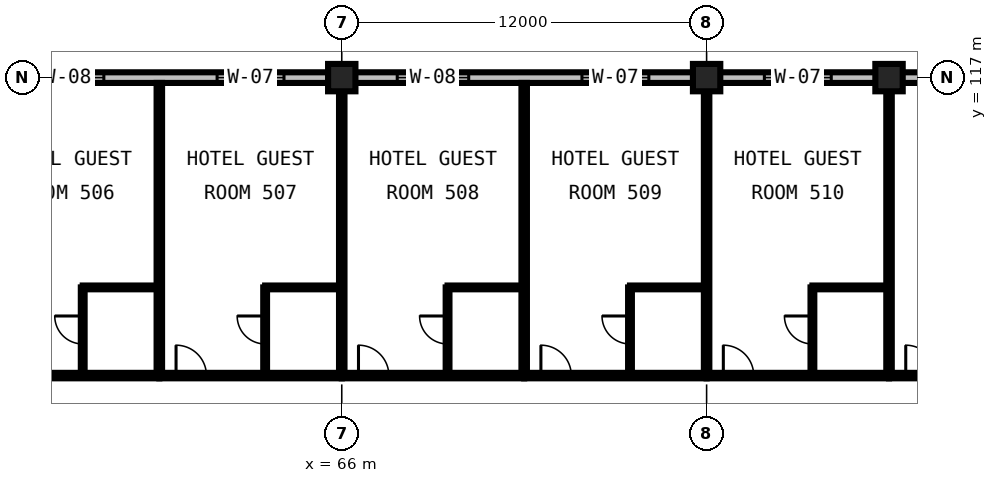
"""IFC4 building model, lengths in metres.
Left out: names, types, materials, properties, quantities, classifications, styles, units other than length and angle.
Written with IfcOpenShell. Run it as: python <this file> out.ifc"""

import sys

from ifc_helpers import new_model, si_unit, direction, frame, frame_2d, origin, origin_2d, place, context, subcontext, project, spatial, rectangle, extrude, element, fill, save


model = new_model("IFC4")
c1 = context("Model", 3, precision=1e-05, world=origin(), true_north=direction((0.0, 1.0)))
c2 = subcontext(c1, "Body", "Model", "MODEL_VIEW")
j1 = project(units=[si_unit("LENGTHUNIT", "METRE"), si_unit("PLANEANGLEUNIT", "RADIAN")], contexts=[c1])
p1 = place(None, origin())
s1 = spatial("IfcSite", under=j1, at=p1, CompositionType="ELEMENT")
p2 = place(p1, origin())
s2 = spatial("IfcBuilding", under=s1, at=p2, CompositionType="ELEMENT")
p3 = place(p2, frame((0.0, 0.0, 27.6)))
s3 = spatial("IfcBuildingStorey", under=s2, at=p3, CompositionType="ELEMENT", Elevation=27.6)
for number, where, z_axis, x_axis in (
    (1, (66.0, 117.0, 0.0), (0.0, 0.0, 1.0), (1.0, 0.0, 0.0)),
    (2, (78.0, 117.0, 0.0), (0.0, 0.0, 1.0), (1.0, 0.0, 0.0)),
    (3, (84.0, 117.0, 0.0), (0.0, 0.0, 1.0), (1.0, 0.0, 0.0)),
):
    element("IfcColumn", number, at=place(p3, frame(where, z_axis=z_axis, x_axis=x_axis)), inside=s3, PredefinedType="COLUMN", context=c2, shape_type="SweptSolid", body=[
        extrude(rectangle(XDim=0.9, YDim=0.9, at=origin_2d()), origin(), (0.0, 0.0, 1.0), 3.6),
    ])
p4 = place(p3, frame((66.0, 117.0, 0.0), z_axis=(0.0, 0.0, 1.0), x_axis=(-1.0, 0.0, 0.0)))
e4 = element("IfcWall", 4, at=p4, inside=s3, PredefinedType="STANDARD", context=c2, shape_type="SweptSolid", body=[
    extrude(rectangle(XDim=12.0, YDim=0.35, at=frame_2d((6.0, 0.0))), origin(), (0.0, 0.0, 1.0), 2.486),
])
p5 = place(p4, frame((1.9, 0.0, 0.75)))
e5 = element("IfcOpeningElement", 5, at=p5, cuts=e4, PredefinedType="OPENING", context=c2, shape_type="SweptSolid", body=[
    extrude(rectangle(XDim=2.2, YDim=1.6, at=frame_2d((1.1, 0.8))), frame((0.0, 0.19, 0.0), z_axis=(0.0, -1.0, 0.0), x_axis=(1.0, 0.0, 0.0)), (0.0, 0.0, 1.0), 0.38),
])
p6 = place(p4, frame((7.825, 0.0, 0.75)))
e6 = element("IfcOpeningElement", 6, at=p6, cuts=e4, PredefinedType="OPENING", context=c2, shape_type="SweptSolid", body=[
    extrude(rectangle(XDim=2.35, YDim=1.6, at=frame_2d((1.175, 0.8))), frame((0.0, 0.19, 0.0), z_axis=(0.0, -1.0, 0.0), x_axis=(1.0, 0.0, 0.0)), (0.0, 0.0, 1.0), 0.38),
])
p7 = place(p3, frame((78.0, 117.0, 0.0), z_axis=(0.0, 0.0, 1.0), x_axis=(-1.0, 0.0, 0.0)))
e7 = element("IfcWall", 7, at=p7, inside=s3, PredefinedType="STANDARD", context=c2, shape_type="SweptSolid", body=[
    extrude(rectangle(XDim=12.0, YDim=0.35, at=frame_2d((6.0, 0.0))), origin(), (0.0, 0.0, 1.0), 2.486),
])
p8 = place(p7, frame((1.9, 0.0, 0.75)))
e8 = element("IfcOpeningElement", 8, at=p8, cuts=e7, PredefinedType="OPENING", context=c2, shape_type="SweptSolid", body=[
    extrude(rectangle(XDim=2.2, YDim=1.6, at=frame_2d((1.1, 0.8))), frame((0.0, 0.19, 0.0), z_axis=(0.0, -1.0, 0.0), x_axis=(1.0, 0.0, 0.0)), (0.0, 0.0, 1.0), 0.38),
])
p9 = place(p7, frame((7.825, 0.0, 0.75)))
e9 = element("IfcOpeningElement", 9, at=p9, cuts=e7, PredefinedType="OPENING", context=c2, shape_type="SweptSolid", body=[
    extrude(rectangle(XDim=2.35, YDim=1.6, at=frame_2d((1.175, 0.8))), frame((0.0, 0.19, 0.0), z_axis=(0.0, -1.0, 0.0), x_axis=(1.0, 0.0, 0.0)), (0.0, 0.0, 1.0), 0.38),
])
p10 = place(p3, frame((84.0, 117.0, 0.0), z_axis=(0.0, 0.0, 1.0), x_axis=(-1.0, 0.0, 0.0)))
e10 = element("IfcWall", 10, at=p10, inside=s3, PredefinedType="STANDARD", context=c2, shape_type="SweptSolid", body=[
    extrude(rectangle(XDim=6.0, YDim=0.35, at=frame_2d((3.0, 0.0))), origin(), (0.0, 0.0, 1.0), 2.486),
])
p11 = place(p10, frame((1.9, 0.0, 0.75)))
e11 = element("IfcOpeningElement", 11, at=p11, cuts=e10, PredefinedType="OPENING", context=c2, shape_type="SweptSolid", body=[
    extrude(rectangle(XDim=2.2, YDim=1.6, at=frame_2d((1.1, 0.8))), frame((0.0, 0.19, 0.0), z_axis=(0.0, -1.0, 0.0), x_axis=(1.0, 0.0, 0.0)), (0.0, 0.0, 1.0), 0.38),
])
p12 = place(p3, frame((90.0, 117.0, 0.0), z_axis=(0.0, 0.0, 1.0), x_axis=(-1.0, 0.0, 0.0)))
e12 = element("IfcWall", 12, at=p12, inside=s3, PredefinedType="STANDARD", context=c2, shape_type="SweptSolid", body=[
    extrude(rectangle(XDim=6.0, YDim=0.35, at=frame_2d((3.0, 0.0))), origin(), (0.0, 0.0, 1.0), 2.486),
])
p13 = place(p12, frame((1.9, 0.0, 0.75)))
e13 = element("IfcOpeningElement", 13, at=p13, cuts=e12, PredefinedType="OPENING", context=c2, shape_type="SweptSolid", body=[
    extrude(rectangle(XDim=2.2, YDim=1.6, at=frame_2d((1.1, 0.8))), frame((0.0, 0.19, 0.0), z_axis=(0.0, -1.0, 0.0), x_axis=(1.0, 0.0, 0.0)), (0.0, 0.0, 1.0), 0.38),
])
p14 = place(p3, frame((54.0, 107.2, 0.0), z_axis=(0.0, 0.0, 1.0), x_axis=(1.0, 0.0, 0.0)))
e14 = element("IfcWall", 14, at=p14, inside=s3, PredefinedType="PARTITIONING", context=c2, shape_type="SweptSolid", body=[
    extrude(rectangle(XDim=6.0, YDim=0.18, at=frame_2d((3.0, 0.0))), origin(), (0.0, 0.0, 1.0), 3.29),
])
p15 = place(p14, frame((0.55, 0.0, 0.0)))
e15 = element("IfcOpeningElement", 15, at=p15, cuts=e14, PredefinedType="OPENING", context=c2, shape_type="SweptSolid", body=[
    extrude(rectangle(XDim=1.0, YDim=2.15, at=frame_2d((0.5, 1.075))), frame((0.0, 0.105, 0.0), z_axis=(0.0, -1.0, 0.0), x_axis=(1.0, 0.0, 0.0)), (0.0, 0.0, 1.0), 0.21),
])
p16 = place(p3, frame((60.0, 107.2, 0.0), z_axis=(0.0, 0.0, 1.0), x_axis=(0.0, 1.0, 0.0)))
e16 = element("IfcWall", 16, at=p16, inside=s3, PredefinedType="PARTITIONING", context=c2, shape_type="SweptSolid", body=[
    extrude(rectangle(XDim=9.625, YDim=0.18, at=frame_2d((4.812, 0.0))), origin(), (0.0, 0.0, 1.0), 3.29),
])
p17 = place(p3, frame((57.48, 107.29, 0.0), z_axis=(0.0, 0.0, 1.0), x_axis=(0.0, 1.0, 0.0)))
e17 = element("IfcWall", 17, at=p17, inside=s3, PredefinedType="PARTITIONING", context=c2, shape_type="SweptSolid", body=[
    extrude(rectangle(XDim=2.81, YDim=0.125, at=frame_2d((1.405, 0.0))), origin(), (0.0, 0.0, 1.0), 3.29),
])
p18 = place(p17, frame((0.95, 0.0, 0.0)))
e18 = element("IfcOpeningElement", 18, at=p18, cuts=e17, PredefinedType="OPENING", context=c2, shape_type="SweptSolid", body=[
    extrude(rectangle(XDim=0.92, YDim=2.1, at=frame_2d((0.46, 1.05))), frame((0.0, 0.077, 0.0), z_axis=(0.0, -1.0, 0.0), x_axis=(1.0, 0.0, 0.0)), (0.0, 0.0, 1.0), 0.155),
])
p19 = place(p3, frame((57.48, 110.1, 0.0), z_axis=(0.0, 0.0, 1.0), x_axis=(1.0, 0.0, 0.0)))
e19 = element("IfcWall", 19, at=p19, inside=s3, PredefinedType="PARTITIONING", context=c2, shape_type="SweptSolid", body=[
    extrude(rectangle(XDim=2.52, YDim=0.125, at=frame_2d((1.26, 0.0))), origin(), (0.0, 0.0, 1.0), 3.29),
])
p20 = place(p3, frame((60.0, 107.2, 0.0), z_axis=(0.0, 0.0, 1.0), x_axis=(1.0, 0.0, 0.0)))
e20 = element("IfcWall", 20, at=p20, inside=s3, PredefinedType="PARTITIONING", context=c2, shape_type="SweptSolid", body=[
    extrude(rectangle(XDim=6.0, YDim=0.18, at=frame_2d((3.0, 0.0))), origin(), (0.0, 0.0, 1.0), 3.29),
])
p21 = place(p20, frame((0.55, 0.0, 0.0)))
e21 = element("IfcOpeningElement", 21, at=p21, cuts=e20, PredefinedType="OPENING", context=c2, shape_type="SweptSolid", body=[
    extrude(rectangle(XDim=1.0, YDim=2.15, at=frame_2d((0.5, 1.075))), frame((0.0, 0.105, 0.0), z_axis=(0.0, -1.0, 0.0), x_axis=(1.0, 0.0, 0.0)), (0.0, 0.0, 1.0), 0.21),
])
p22 = place(p3, frame((66.0, 107.2, 0.0), z_axis=(0.0, 0.0, 1.0), x_axis=(0.0, 1.0, 0.0)))
e22 = element("IfcWall", 22, at=p22, inside=s3, PredefinedType="PARTITIONING", context=c2, shape_type="SweptSolid", body=[
    extrude(rectangle(XDim=9.625, YDim=0.18, at=frame_2d((4.812, 0.0))), origin(), (0.0, 0.0, 1.0), 2.59),
])
p23 = place(p3, frame((63.48, 107.29, 0.0), z_axis=(0.0, 0.0, 1.0), x_axis=(0.0, 1.0, 0.0)))
e23 = element("IfcWall", 23, at=p23, inside=s3, PredefinedType="PARTITIONING", context=c2, shape_type="SweptSolid", body=[
    extrude(rectangle(XDim=2.81, YDim=0.125, at=frame_2d((1.405, 0.0))), origin(), (0.0, 0.0, 1.0), 3.29),
])
p24 = place(p23, frame((0.95, 0.0, 0.0)))
e24 = element("IfcOpeningElement", 24, at=p24, cuts=e23, PredefinedType="OPENING", context=c2, shape_type="SweptSolid", body=[
    extrude(rectangle(XDim=0.92, YDim=2.1, at=frame_2d((0.46, 1.05))), frame((0.0, 0.077, 0.0), z_axis=(0.0, -1.0, 0.0), x_axis=(1.0, 0.0, 0.0)), (0.0, 0.0, 1.0), 0.155),
])
p25 = place(p3, frame((63.48, 110.1, 0.0), z_axis=(0.0, 0.0, 1.0), x_axis=(1.0, 0.0, 0.0)))
e25 = element("IfcWall", 25, at=p25, inside=s3, PredefinedType="PARTITIONING", context=c2, shape_type="SweptSolid", body=[
    extrude(rectangle(XDim=2.52, YDim=0.125, at=frame_2d((1.26, 0.0))), origin(), (0.0, 0.0, 1.0), 3.29),
])
p26 = place(p3, frame((66.0, 107.2, 0.0), z_axis=(0.0, 0.0, 1.0), x_axis=(1.0, 0.0, 0.0)))
e26 = element("IfcWall", 26, at=p26, inside=s3, PredefinedType="PARTITIONING", context=c2, shape_type="SweptSolid", body=[
    extrude(rectangle(XDim=6.0, YDim=0.18, at=frame_2d((3.0, 0.0))), origin(), (0.0, 0.0, 1.0), 3.29),
])
p27 = place(p26, frame((0.55, 0.0, 0.0)))
e27 = element("IfcOpeningElement", 27, at=p27, cuts=e26, PredefinedType="OPENING", context=c2, shape_type="SweptSolid", body=[
    extrude(rectangle(XDim=1.0, YDim=2.15, at=frame_2d((0.5, 1.075))), frame((0.0, 0.105, 0.0), z_axis=(0.0, -1.0, 0.0), x_axis=(1.0, 0.0, 0.0)), (0.0, 0.0, 1.0), 0.21),
])
p28 = place(p3, frame((72.0, 107.2, 0.0), z_axis=(0.0, 0.0, 1.0), x_axis=(0.0, 1.0, 0.0)))
e28 = element("IfcWall", 28, at=p28, inside=s3, PredefinedType="PARTITIONING", context=c2, shape_type="SweptSolid", body=[
    extrude(rectangle(XDim=9.625, YDim=0.18, at=frame_2d((4.812, 0.0))), origin(), (0.0, 0.0, 1.0), 3.29),
])
p29 = place(p3, frame((69.48, 107.29, 0.0), z_axis=(0.0, 0.0, 1.0), x_axis=(0.0, 1.0, 0.0)))
e29 = element("IfcWall", 29, at=p29, inside=s3, PredefinedType="PARTITIONING", context=c2, shape_type="SweptSolid", body=[
    extrude(rectangle(XDim=2.81, YDim=0.125, at=frame_2d((1.405, 0.0))), origin(), (0.0, 0.0, 1.0), 3.29),
])
p30 = place(p29, frame((0.95, 0.0, 0.0)))
e30 = element("IfcOpeningElement", 30, at=p30, cuts=e29, PredefinedType="OPENING", context=c2, shape_type="SweptSolid", body=[
    extrude(rectangle(XDim=0.92, YDim=2.1, at=frame_2d((0.46, 1.05))), frame((0.0, 0.077, 0.0), z_axis=(0.0, -1.0, 0.0), x_axis=(1.0, 0.0, 0.0)), (0.0, 0.0, 1.0), 0.155),
])
p31 = place(p3, frame((69.48, 110.1, 0.0), z_axis=(0.0, 0.0, 1.0), x_axis=(1.0, 0.0, 0.0)))
e31 = element("IfcWall", 31, at=p31, inside=s3, PredefinedType="PARTITIONING", context=c2, shape_type="SweptSolid", body=[
    extrude(rectangle(XDim=2.52, YDim=0.125, at=frame_2d((1.26, 0.0))), origin(), (0.0, 0.0, 1.0), 3.29),
])
p32 = place(p3, frame((72.0, 107.2, 0.0), z_axis=(0.0, 0.0, 1.0), x_axis=(1.0, 0.0, 0.0)))
e32 = element("IfcWall", 32, at=p32, inside=s3, PredefinedType="PARTITIONING", context=c2, shape_type="SweptSolid", body=[
    extrude(rectangle(XDim=6.0, YDim=0.18, at=frame_2d((3.0, 0.0))), origin(), (0.0, 0.0, 1.0), 3.29),
])
p33 = place(p32, frame((0.55, 0.0, 0.0)))
e33 = element("IfcOpeningElement", 33, at=p33, cuts=e32, PredefinedType="OPENING", context=c2, shape_type="SweptSolid", body=[
    extrude(rectangle(XDim=1.0, YDim=2.15, at=frame_2d((0.5, 1.075))), frame((0.0, 0.105, 0.0), z_axis=(0.0, -1.0, 0.0), x_axis=(1.0, 0.0, 0.0)), (0.0, 0.0, 1.0), 0.21),
])
p34 = place(p3, frame((78.0, 107.2, 0.0), z_axis=(0.0, 0.0, 1.0), x_axis=(0.0, 1.0, 0.0)))
e34 = element("IfcWall", 34, at=p34, inside=s3, PredefinedType="PARTITIONING", context=c2, shape_type="SweptSolid", body=[
    extrude(rectangle(XDim=9.625, YDim=0.18, at=frame_2d((4.812, 0.0))), origin(), (0.0, 0.0, 1.0), 2.59),
])
p35 = place(p3, frame((75.48, 107.29, 0.0), z_axis=(0.0, 0.0, 1.0), x_axis=(0.0, 1.0, 0.0)))
e35 = element("IfcWall", 35, at=p35, inside=s3, PredefinedType="PARTITIONING", context=c2, shape_type="SweptSolid", body=[
    extrude(rectangle(XDim=2.81, YDim=0.125, at=frame_2d((1.405, 0.0))), origin(), (0.0, 0.0, 1.0), 3.29),
])
p36 = place(p35, frame((0.95, 0.0, 0.0)))
e36 = element("IfcOpeningElement", 36, at=p36, cuts=e35, PredefinedType="OPENING", context=c2, shape_type="SweptSolid", body=[
    extrude(rectangle(XDim=0.92, YDim=2.1, at=frame_2d((0.46, 1.05))), frame((0.0, 0.077, 0.0), z_axis=(0.0, -1.0, 0.0), x_axis=(1.0, 0.0, 0.0)), (0.0, 0.0, 1.0), 0.155),
])
p37 = place(p3, frame((75.48, 110.1, 0.0), z_axis=(0.0, 0.0, 1.0), x_axis=(1.0, 0.0, 0.0)))
e37 = element("IfcWall", 37, at=p37, inside=s3, PredefinedType="PARTITIONING", context=c2, shape_type="SweptSolid", body=[
    extrude(rectangle(XDim=2.52, YDim=0.125, at=frame_2d((1.26, 0.0))), origin(), (0.0, 0.0, 1.0), 3.29),
])
p38 = place(p3, frame((78.0, 107.2, 0.0), z_axis=(0.0, 0.0, 1.0), x_axis=(1.0, 0.0, 0.0)))
e38 = element("IfcWall", 38, at=p38, inside=s3, PredefinedType="PARTITIONING", context=c2, shape_type="SweptSolid", body=[
    extrude(rectangle(XDim=6.0, YDim=0.18, at=frame_2d((3.0, 0.0))), origin(), (0.0, 0.0, 1.0), 3.29),
])
p39 = place(p38, frame((0.55, 0.0, 0.0)))
e39 = element("IfcOpeningElement", 39, at=p39, cuts=e38, PredefinedType="OPENING", context=c2, shape_type="SweptSolid", body=[
    extrude(rectangle(XDim=1.0, YDim=2.15, at=frame_2d((0.5, 1.075))), frame((0.0, 0.105, 0.0), z_axis=(0.0, -1.0, 0.0), x_axis=(1.0, 0.0, 0.0)), (0.0, 0.0, 1.0), 0.21),
])
p40 = place(p3, frame((84.0, 107.2, 0.0), z_axis=(0.0, 0.0, 1.0), x_axis=(0.0, 1.0, 0.0)))
e40 = element("IfcWall", 40, at=p40, inside=s3, PredefinedType="PARTITIONING", context=c2, shape_type="SweptSolid", body=[
    extrude(rectangle(XDim=9.625, YDim=0.18, at=frame_2d((4.812, 0.0))), origin(), (0.0, 0.0, 1.0), 2.59),
])
p41 = place(p3, frame((81.48, 107.29, 0.0), z_axis=(0.0, 0.0, 1.0), x_axis=(0.0, 1.0, 0.0)))
e41 = element("IfcWall", 41, at=p41, inside=s3, PredefinedType="PARTITIONING", context=c2, shape_type="SweptSolid", body=[
    extrude(rectangle(XDim=2.81, YDim=0.125, at=frame_2d((1.405, 0.0))), origin(), (0.0, 0.0, 1.0), 3.29),
])
p42 = place(p41, frame((0.95, 0.0, 0.0)))
e42 = element("IfcOpeningElement", 42, at=p42, cuts=e41, PredefinedType="OPENING", context=c2, shape_type="SweptSolid", body=[
    extrude(rectangle(XDim=0.92, YDim=2.1, at=frame_2d((0.46, 1.05))), frame((0.0, 0.077, 0.0), z_axis=(0.0, -1.0, 0.0), x_axis=(1.0, 0.0, 0.0)), (0.0, 0.0, 1.0), 0.155),
])
p43 = place(p3, frame((81.48, 110.1, 0.0), z_axis=(0.0, 0.0, 1.0), x_axis=(1.0, 0.0, 0.0)))
e43 = element("IfcWall", 43, at=p43, inside=s3, PredefinedType="PARTITIONING", context=c2, shape_type="SweptSolid", body=[
    extrude(rectangle(XDim=2.52, YDim=0.125, at=frame_2d((1.26, 0.0))), origin(), (0.0, 0.0, 1.0), 3.29),
])
p44 = place(p3, frame((84.0, 107.2, 0.0), z_axis=(0.0, 0.0, 1.0), x_axis=(1.0, 0.0, 0.0)))
e44 = element("IfcWall", 44, at=p44, inside=s3, PredefinedType="PARTITIONING", context=c2, shape_type="SweptSolid", body=[
    extrude(rectangle(XDim=6.0, YDim=0.18, at=frame_2d((3.0, 0.0))), origin(), (0.0, 0.0, 1.0), 3.29),
])
p45 = place(p44, frame((0.55, 0.0, 0.0)))
e45 = element("IfcOpeningElement", 45, at=p45, cuts=e44, PredefinedType="OPENING", context=c2, shape_type="SweptSolid", body=[
    extrude(rectangle(XDim=1.0, YDim=2.15, at=frame_2d((0.5, 1.075))), frame((0.0, 0.105, 0.0), z_axis=(0.0, -1.0, 0.0), x_axis=(1.0, 0.0, 0.0)), (0.0, 0.0, 1.0), 0.21),
])
p46 = place(p5, origin())
e46 = element("IfcWindow", 46, at=p46, inside=s3, PartitioningType="DOUBLE_PANEL_VERTICAL", PredefinedType="WINDOW", context=c2, shape_type="SweptSolid", body=[
    extrude(rectangle(XDim=2.2, YDim=1.6, at=frame_2d((1.1, 0.8))), frame((0.0, 0.03, 0.0), z_axis=(0.0, -1.0, 0.0), x_axis=(1.0, 0.0, 0.0)), (0.0, 0.0, 1.0), 0.06),
])
fill(e5, e46)
p47 = place(p6, origin())
e47 = element("IfcWindow", 47, at=p47, inside=s3, PartitioningType="DOUBLE_PANEL_VERTICAL", PredefinedType="WINDOW", context=c2, shape_type="SweptSolid", body=[
    extrude(rectangle(XDim=2.35, YDim=1.6, at=frame_2d((1.175, 0.8))), frame((0.0, 0.03, 0.0), z_axis=(0.0, -1.0, 0.0), x_axis=(1.0, 0.0, 0.0)), (0.0, 0.0, 1.0), 0.06),
])
fill(e6, e47)
p48 = place(p8, origin())
e48 = element("IfcWindow", 48, at=p48, inside=s3, PartitioningType="DOUBLE_PANEL_VERTICAL", PredefinedType="WINDOW", context=c2, shape_type="SweptSolid", body=[
    extrude(rectangle(XDim=2.2, YDim=1.6, at=frame_2d((1.1, 0.8))), frame((0.0, 0.03, 0.0), z_axis=(0.0, -1.0, 0.0), x_axis=(1.0, 0.0, 0.0)), (0.0, 0.0, 1.0), 0.06),
])
fill(e8, e48)
p49 = place(p9, origin())
e49 = element("IfcWindow", 49, at=p49, inside=s3, PartitioningType="DOUBLE_PANEL_VERTICAL", PredefinedType="WINDOW", context=c2, shape_type="SweptSolid", body=[
    extrude(rectangle(XDim=2.35, YDim=1.6, at=frame_2d((1.175, 0.8))), frame((0.0, 0.03, 0.0), z_axis=(0.0, -1.0, 0.0), x_axis=(1.0, 0.0, 0.0)), (0.0, 0.0, 1.0), 0.06),
])
fill(e9, e49)
p50 = place(p11, origin())
e50 = element("IfcWindow", 50, at=p50, inside=s3, PartitioningType="DOUBLE_PANEL_VERTICAL", PredefinedType="WINDOW", context=c2, shape_type="SweptSolid", body=[
    extrude(rectangle(XDim=2.2, YDim=1.6, at=frame_2d((1.1, 0.8))), frame((0.0, 0.03, 0.0), z_axis=(0.0, -1.0, 0.0), x_axis=(1.0, 0.0, 0.0)), (0.0, 0.0, 1.0), 0.06),
])
fill(e11, e50)
p51 = place(p18, origin())
e51 = element("IfcDoor", 51, at=p51, inside=s3, OperationType="SINGLE_SWING_RIGHT", PredefinedType="DOOR", context=c2, shape_type="SweptSolid", body=[
    extrude(rectangle(XDim=0.92, YDim=2.1, at=frame_2d((0.46, 1.05))), frame((0.0, 0.025, 0.0), z_axis=(0.0, -1.0, 0.0), x_axis=(1.0, 0.0, 0.0)), (0.0, 0.0, 1.0), 0.05),
])
fill(e18, e51)
p52 = place(p21, origin())
e52 = element("IfcDoor", 52, at=p52, inside=s3, OperationType="SINGLE_SWING_LEFT", PredefinedType="DOOR", context=c2, shape_type="SweptSolid", body=[
    extrude(rectangle(XDim=1.0, YDim=2.15, at=frame_2d((0.5, 1.075))), frame((0.0, 0.025, 0.0), z_axis=(0.0, -1.0, 0.0), x_axis=(1.0, 0.0, 0.0)), (0.0, 0.0, 1.0), 0.05),
])
fill(e21, e52)
p53 = place(p24, origin())
e53 = element("IfcDoor", 53, at=p53, inside=s3, OperationType="SINGLE_SWING_RIGHT", PredefinedType="DOOR", context=c2, shape_type="SweptSolid", body=[
    extrude(rectangle(XDim=0.92, YDim=2.1, at=frame_2d((0.46, 1.05))), frame((0.0, 0.025, 0.0), z_axis=(0.0, -1.0, 0.0), x_axis=(1.0, 0.0, 0.0)), (0.0, 0.0, 1.0), 0.05),
])
fill(e24, e53)
p54 = place(p27, origin())
e54 = element("IfcDoor", 54, at=p54, inside=s3, OperationType="SINGLE_SWING_LEFT", PredefinedType="DOOR", context=c2, shape_type="SweptSolid", body=[
    extrude(rectangle(XDim=1.0, YDim=2.15, at=frame_2d((0.5, 1.075))), frame((0.0, 0.025, 0.0), z_axis=(0.0, -1.0, 0.0), x_axis=(1.0, 0.0, 0.0)), (0.0, 0.0, 1.0), 0.05),
])
fill(e27, e54)
p55 = place(p30, origin())
e55 = element("IfcDoor", 55, at=p55, inside=s3, OperationType="SINGLE_SWING_RIGHT", PredefinedType="DOOR", context=c2, shape_type="SweptSolid", body=[
    extrude(rectangle(XDim=0.92, YDim=2.1, at=frame_2d((0.46, 1.05))), frame((0.0, 0.025, 0.0), z_axis=(0.0, -1.0, 0.0), x_axis=(1.0, 0.0, 0.0)), (0.0, 0.0, 1.0), 0.05),
])
fill(e30, e55)
p56 = place(p33, origin())
e56 = element("IfcDoor", 56, at=p56, inside=s3, OperationType="SINGLE_SWING_LEFT", PredefinedType="DOOR", context=c2, shape_type="SweptSolid", body=[
    extrude(rectangle(XDim=1.0, YDim=2.15, at=frame_2d((0.5, 1.075))), frame((0.0, 0.025, 0.0), z_axis=(0.0, -1.0, 0.0), x_axis=(1.0, 0.0, 0.0)), (0.0, 0.0, 1.0), 0.05),
])
fill(e33, e56)
p57 = place(p36, origin())
e57 = element("IfcDoor", 57, at=p57, inside=s3, OperationType="SINGLE_SWING_RIGHT", PredefinedType="DOOR", context=c2, shape_type="SweptSolid", body=[
    extrude(rectangle(XDim=0.92, YDim=2.1, at=frame_2d((0.46, 1.05))), frame((0.0, 0.025, 0.0), z_axis=(0.0, -1.0, 0.0), x_axis=(1.0, 0.0, 0.0)), (0.0, 0.0, 1.0), 0.05),
])
fill(e36, e57)
p58 = place(p39, origin())
e58 = element("IfcDoor", 58, at=p58, inside=s3, OperationType="SINGLE_SWING_LEFT", PredefinedType="DOOR", context=c2, shape_type="SweptSolid", body=[
    extrude(rectangle(XDim=1.0, YDim=2.15, at=frame_2d((0.5, 1.075))), frame((0.0, 0.025, 0.0), z_axis=(0.0, -1.0, 0.0), x_axis=(1.0, 0.0, 0.0)), (0.0, 0.0, 1.0), 0.05),
])
fill(e39, e58)
p59 = place(p42, origin())
e59 = element("IfcDoor", 59, at=p59, inside=s3, OperationType="SINGLE_SWING_RIGHT", PredefinedType="DOOR", context=c2, shape_type="SweptSolid", body=[
    extrude(rectangle(XDim=0.92, YDim=2.1, at=frame_2d((0.46, 1.05))), frame((0.0, 0.025, 0.0), z_axis=(0.0, -1.0, 0.0), x_axis=(1.0, 0.0, 0.0)), (0.0, 0.0, 1.0), 0.05),
])
fill(e42, e59)
p60 = place(p45, origin())
e60 = element("IfcDoor", 60, at=p60, inside=s3, OperationType="SINGLE_SWING_LEFT", PredefinedType="DOOR", context=c2, shape_type="SweptSolid", body=[
    extrude(rectangle(XDim=1.0, YDim=2.15, at=frame_2d((0.5, 1.075))), frame((0.0, 0.025, 0.0), z_axis=(0.0, -1.0, 0.0), x_axis=(1.0, 0.0, 0.0)), (0.0, 0.0, 1.0), 0.05),
])
fill(e45, e60)
save(model, sys.argv[1])
